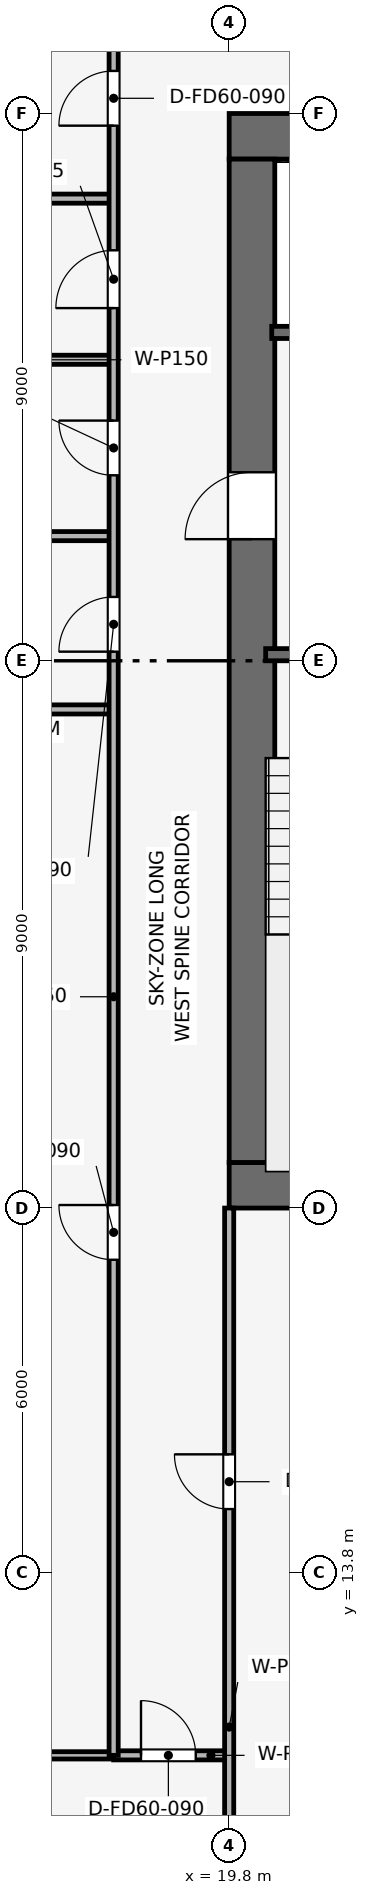
"""IFC4 building model, lengths in metres.
Left out: names, types, materials, properties, quantities, classifications, styles, units other than length and angle.
Written with IfcOpenShell. Run it as: python <this file> out.ifc"""

import sys

from ifc_helpers import new_model, si_unit, direction, frame, frame_2d, origin, place, context, subcontext, project, spatial, rectangle, extrude, element, fill, save


model = new_model("IFC4")
c1 = context("Model", 3, precision=1e-05, world=origin(), true_north=direction((0.0, 1.0)))
c2 = subcontext(c1, "Body", "Model", "MODEL_VIEW")
j1 = project(units=[si_unit("LENGTHUNIT", "METRE"), si_unit("PLANEANGLEUNIT", "RADIAN")], contexts=[c1])
p1 = place(None, origin())
s1 = spatial("IfcSite", under=j1, at=p1, CompositionType="ELEMENT")
p2 = place(p1, origin())
s2 = spatial("IfcBuilding", under=s1, at=p2, CompositionType="ELEMENT")
p3 = place(p2, frame((0.0, 0.0, 261.6)))
s3 = spatial("IfcBuildingStorey", under=s2, at=p3, CompositionType="ELEMENT", Elevation=261.6)
p4 = place(p3, frame((19.8, 20.175, 0.0), z_axis=(0.0, 0.0, 1.0), x_axis=(1.0, 0.0, 0.0)))
e1 = element("IfcWall", 1, at=p4, inside=s3, PredefinedType="SHEAR", context=c2, shape_type="SweptSolid", body=[
    extrude(rectangle(XDim=18.0, YDim=0.75, at=frame_2d((9.0, 0.0))), origin(), (0.0, 0.0, 1.0), 3.75),
])
p5 = place(p3, frame((19.8, 37.425, 0.0), z_axis=(0.0, 0.0, 1.0), x_axis=(1.0, 0.0, 0.0)))
e2 = element("IfcWall", 2, at=p5, inside=s3, PredefinedType="SHEAR", context=c2, shape_type="SweptSolid", body=[
    extrude(rectangle(XDim=18.0, YDim=0.75, at=frame_2d((9.0, 0.0))), origin(), (0.0, 0.0, 1.0), 3.75),
])
p6 = place(p5, frame((7.05, 0.0, 0.0)))
e3 = element("IfcOpeningElement", 3, at=p6, cuts=e2, PredefinedType="OPENING", context=c2, shape_type="SweptSolid", body=[
    extrude(rectangle(XDim=1.1, YDim=2.15, at=frame_2d((0.55, 1.075))), frame((0.0, 0.385, 0.0), z_axis=(0.0, -1.0, 0.0), x_axis=(1.0, 0.0, 0.0)), (0.0, 0.0, 1.0), 0.77),
])
p7 = place(p3, frame((20.175, 20.55, 0.0), z_axis=(0.0, 0.0, 1.0), x_axis=(0.0, 1.0, 0.0)))
e4 = element("IfcWall", 4, at=p7, inside=s3, PredefinedType="SHEAR", context=c2, shape_type="SweptSolid", body=[
    extrude(rectangle(XDim=16.5, YDim=0.75, at=frame_2d((8.25, 0.0))), origin(), (0.0, 0.0, 1.0), 3.75),
])
p8 = place(p7, frame((10.25, 0.0, 0.0)))
e5 = element("IfcOpeningElement", 5, at=p8, cuts=e4, PredefinedType="OPENING", context=c2, shape_type="SweptSolid", body=[
    extrude(rectangle(XDim=1.1, YDim=2.15, at=frame_2d((0.55, 1.075))), frame((0.0, 0.385, 0.0), z_axis=(0.0, -1.0, 0.0), x_axis=(1.0, 0.0, 0.0)), (0.0, 0.0, 1.0), 0.77),
])
p9 = place(p3, frame((20.4, 28.9, 0.0), z_axis=(0.0, 0.0, 1.0), x_axis=(1.0, 0.0, 0.0)))
e6 = element("IfcWall", 6, at=p9, inside=s3, PredefinedType="SHEAR", context=c2, shape_type="SweptSolid", body=[
    extrude(rectangle(XDim=3.15, YDim=0.2, at=frame_2d((1.575, 0.0))), origin(), (0.0, 0.0, 1.0), 3.5),
])
p10 = place(p9, frame((0.8, 0.0, 0.0)))
e7 = element("IfcOpeningElement", 7, at=p10, cuts=e6, PredefinedType="OPENING", context=c2, shape_type="SweptSolid", body=[
    extrude(rectangle(XDim=1.0, YDim=2.1, at=frame_2d((0.5, 1.05))), frame((0.0, 0.11, 0.0), z_axis=(0.0, -1.0, 0.0), x_axis=(1.0, 0.0, 0.0)), (0.0, 0.0, 1.0), 0.22),
])
p11 = place(p3, frame((20.5, 34.2, 0.0), z_axis=(0.0, 0.0, 1.0), x_axis=(1.0, 0.0, 0.0)))
e8 = element("IfcWall", 8, at=p11, inside=s3, PredefinedType="SHEAR", context=c2, shape_type="SweptSolid", body=[
    extrude(rectangle(XDim=3.05, YDim=0.2, at=frame_2d((1.525, 0.0))), origin(), (0.0, 0.0, 1.0), 3.5),
])
p12 = place(p11, frame((0.75, 0.0, 0.0)))
e9 = element("IfcOpeningElement", 9, at=p12, cuts=e8, PredefinedType="OPENING", context=c2, shape_type="SweptSolid", body=[
    extrude(rectangle(XDim=1.1, YDim=2.15, at=frame_2d((0.55, 1.075))), frame((0.0, 0.11, 0.0), z_axis=(0.0, -1.0, 0.0), x_axis=(1.0, 0.0, 0.0)), (0.0, 0.0, 1.0), 0.22),
])
p13 = place(p3, frame((4.03, 28.0, 0.0), z_axis=(0.0, 0.0, 1.0), x_axis=(1.0, 0.0, 0.0)))
e10 = element("IfcWall", 10, at=p13, inside=s3, PredefinedType="PARTITIONING", context=c2, shape_type="SweptSolid", body=[
    extrude(rectangle(XDim=13.87, YDim=0.15, at=frame_2d((6.935, 0.0))), origin(), (0.0, 0.0, 1.0), 3.085),
])
for number, where, z_axis, x_axis in (
    (11, (14.8, 36.4, 0.0), (0.0, 0.0, 1.0), (1.0, 0.0, 0.0)),
    (12, (14.8, 30.85, 0.0), (0.0, 0.0, 1.0), (1.0, 0.0, 0.0)),
    (13, (14.8, 33.75, 0.0), (0.0, 0.0, 1.0), (1.0, 0.0, 0.0)),
):
    element("IfcWall", number, at=place(p3, frame(where, z_axis=z_axis, x_axis=x_axis)), inside=s3, PredefinedType="PARTITIONING", context=c2, shape_type="SweptSolid", body=[
        extrude(rectangle(XDim=3.1, YDim=0.15, at=frame_2d((1.55, 0.0))), origin(), (0.0, 0.0, 1.0), 3.5),
    ])
p14 = place(p3, frame((10.8, 10.8, 0.0), z_axis=(0.0, 0.0, 1.0), x_axis=(1.0, 0.0, 0.0)))
e14 = element("IfcWall", 14, at=p14, inside=s3, PredefinedType="PARTITIONING", context=c2, shape_type="SweptSolid", body=[
    extrude(rectangle(XDim=7.1, YDim=0.12, at=frame_2d((3.55, 0.0))), origin(), (0.0, 0.0, 1.0), 3.085),
])
p15 = place(p3, frame((17.9, 10.8, 0.0), z_axis=(0.0, 0.0, 1.0), x_axis=(1.0, 0.0, 0.0)))
e15 = element("IfcWall", 15, at=p15, inside=s3, PredefinedType="PARTITIONING", context=c2, shape_type="SweptSolid", body=[
    extrude(rectangle(XDim=1.9, YDim=0.15, at=frame_2d((0.95, 0.0))), origin(), (0.0, 0.0, 1.0), 3.5),
])
p16 = place(p15, frame((0.45, 0.0, 0.0)))
e16 = element("IfcOpeningElement", 16, at=p16, cuts=e15, PredefinedType="OPENING", context=c2, shape_type="SweptSolid", body=[
    extrude(rectangle(XDim=0.9, YDim=2.1, at=frame_2d((0.45, 1.05))), frame((0.0, 0.085, 0.0), z_axis=(0.0, -1.0, 0.0), x_axis=(1.0, 0.0, 0.0)), (0.0, 0.0, 1.0), 0.17),
])
p17 = place(p3, frame((19.8, 4.03, 0.0), z_axis=(0.0, 0.0, 1.0), x_axis=(0.0, 1.0, 0.0)))
e17 = element("IfcWall", 17, at=p17, inside=s3, PredefinedType="PARTITIONING", context=c2, shape_type="SweptSolid", body=[
    extrude(rectangle(XDim=15.77, YDim=0.15, at=frame_2d((7.885, 0.0))), origin(), (0.0, 0.0, 1.0), 3.085),
])
p18 = place(p17, frame((10.82, 0.0, 0.0)))
e18 = element("IfcOpeningElement", 18, at=p18, cuts=e17, PredefinedType="OPENING", context=c2, shape_type="SweptSolid", body=[
    extrude(rectangle(XDim=0.9, YDim=2.1, at=frame_2d((0.45, 1.05))), frame((0.0, 0.085, 0.0), z_axis=(0.0, -1.0, 0.0), x_axis=(1.0, 0.0, 0.0)), (0.0, 0.0, 1.0), 0.17),
])
p19 = place(p3, frame((17.9, 10.8, 0.0), z_axis=(0.0, 0.0, 1.0), x_axis=(0.0, 1.0, 0.0)))
e19 = element("IfcWall", 19, at=p19, inside=s3, PredefinedType="PARTITIONING", context=c2, shape_type="SweptSolid", body=[
    extrude(rectangle(XDim=28.9, YDim=0.15, at=frame_2d((14.45, 0.0))), origin(), (0.0, 0.0, 1.0), 3.085),
])
p20 = place(p19, frame((8.15, 0.0, 0.0)))
e20 = element("IfcOpeningElement", 20, at=p20, cuts=e19, PredefinedType="OPENING", context=c2, shape_type="SweptSolid", body=[
    extrude(rectangle(XDim=0.9, YDim=2.1, at=frame_2d((0.45, 1.05))), frame((0.0, 0.085, 0.0), z_axis=(0.0, -1.0, 0.0), x_axis=(1.0, 0.0, 0.0)), (0.0, 0.0, 1.0), 0.17),
])
p21 = place(p19, frame((18.15, 0.0, 0.0)))
e21 = element("IfcOpeningElement", 21, at=p21, cuts=e19, PredefinedType="OPENING", context=c2, shape_type="SweptSolid", body=[
    extrude(rectangle(XDim=0.9, YDim=2.1, at=frame_2d((0.45, 1.05))), frame((0.0, 0.085, 0.0), z_axis=(0.0, -1.0, 0.0), x_axis=(1.0, 0.0, 0.0)), (0.0, 0.0, 1.0), 0.17),
])
p22 = place(p19, frame((21.05, 0.0, 0.0)))
e22 = element("IfcOpeningElement", 22, at=p22, cuts=e19, PredefinedType="OPENING", context=c2, shape_type="SweptSolid", body=[
    extrude(rectangle(XDim=0.9, YDim=2.1, at=frame_2d((0.45, 1.05))), frame((0.0, 0.085, 0.0), z_axis=(0.0, -1.0, 0.0), x_axis=(1.0, 0.0, 0.0)), (0.0, 0.0, 1.0), 0.17),
])
p23 = place(p19, frame((23.8, 0.0, 0.0)))
e23 = element("IfcOpeningElement", 23, at=p23, cuts=e19, PredefinedType="OPENING", context=c2, shape_type="SweptSolid", body=[
    extrude(rectangle(XDim=0.95, YDim=2.1, at=frame_2d((0.475, 1.05))), frame((0.0, 0.085, 0.0), z_axis=(0.0, -1.0, 0.0), x_axis=(1.0, 0.0, 0.0)), (0.0, 0.0, 1.0), 0.17),
])
p24 = place(p19, frame((26.8, 0.0, 0.0)))
e24 = element("IfcOpeningElement", 24, at=p24, cuts=e19, PredefinedType="OPENING", context=c2, shape_type="SweptSolid", body=[
    extrude(rectangle(XDim=0.9, YDim=2.1, at=frame_2d((0.45, 1.05))), frame((0.0, 0.085, 0.0), z_axis=(0.0, -1.0, 0.0), x_axis=(1.0, 0.0, 0.0)), (0.0, 0.0, 1.0), 0.17),
])
p25 = place(p16, origin())
e25 = element("IfcDoor", 25, at=p25, inside=s3, OperationType="SINGLE_SWING_LEFT", PredefinedType="DOOR", context=c2, shape_type="SweptSolid", body=[
    extrude(rectangle(XDim=0.9, YDim=2.1, at=frame_2d((0.45, 1.05))), frame((0.0, 0.025, 0.0), z_axis=(0.0, -1.0, 0.0), x_axis=(1.0, 0.0, 0.0)), (0.0, 0.0, 1.0), 0.05),
])
fill(e16, e25)
p26 = place(p18, origin())
e26 = element("IfcDoor", 26, at=p26, inside=s3, OperationType="SINGLE_SWING_RIGHT", PredefinedType="DOOR", context=c2, shape_type="SweptSolid", body=[
    extrude(rectangle(XDim=0.9, YDim=2.1, at=frame_2d((0.45, 1.05))), frame((0.0, 0.025, 0.0), z_axis=(0.0, -1.0, 0.0), x_axis=(1.0, 0.0, 0.0)), (0.0, 0.0, 1.0), 0.05),
])
fill(e18, e26)
p27 = place(p20, origin())
e27 = element("IfcDoor", 27, at=p27, inside=s3, OperationType="SINGLE_SWING_RIGHT", PredefinedType="DOOR", context=c2, shape_type="SweptSolid", body=[
    extrude(rectangle(XDim=0.9, YDim=2.1, at=frame_2d((0.45, 1.05))), frame((0.0, 0.025, 0.0), z_axis=(0.0, -1.0, 0.0), x_axis=(1.0, 0.0, 0.0)), (0.0, 0.0, 1.0), 0.05),
])
fill(e20, e27)
p28 = place(p21, origin())
e28 = element("IfcDoor", 28, at=p28, inside=s3, OperationType="SINGLE_SWING_LEFT", PredefinedType="DOOR", context=c2, shape_type="SweptSolid", body=[
    extrude(rectangle(XDim=0.9, YDim=2.1, at=frame_2d((0.45, 1.05))), frame((0.0, 0.025, 0.0), z_axis=(0.0, -1.0, 0.0), x_axis=(1.0, 0.0, 0.0)), (0.0, 0.0, 1.0), 0.05),
])
fill(e21, e28)
p29 = place(p22, origin())
e29 = element("IfcDoor", 29, at=p29, inside=s3, OperationType="SINGLE_SWING_RIGHT", PredefinedType="DOOR", context=c2, shape_type="SweptSolid", body=[
    extrude(rectangle(XDim=0.9, YDim=2.1, at=frame_2d((0.45, 1.05))), frame((0.0, 0.025, 0.0), z_axis=(0.0, -1.0, 0.0), x_axis=(1.0, 0.0, 0.0)), (0.0, 0.0, 1.0), 0.05),
])
fill(e22, e29)
p30 = place(p23, origin())
e30 = element("IfcDoor", 30, at=p30, inside=s3, OperationType="SINGLE_SWING_LEFT", PredefinedType="DOOR", context=c2, shape_type="SweptSolid", body=[
    extrude(rectangle(XDim=0.95, YDim=2.1, at=frame_2d((0.475, 1.05))), frame((0.0, 0.025, 0.0), z_axis=(0.0, -1.0, 0.0), x_axis=(1.0, 0.0, 0.0)), (0.0, 0.0, 1.0), 0.05),
])
fill(e23, e30)
p31 = place(p24, origin())
e31 = element("IfcDoor", 31, at=p31, inside=s3, OperationType="SINGLE_SWING_LEFT", PredefinedType="DOOR", context=c2, shape_type="SweptSolid", body=[
    extrude(rectangle(XDim=0.9, YDim=2.1, at=frame_2d((0.45, 1.05))), frame((0.0, 0.025, 0.0), z_axis=(0.0, -1.0, 0.0), x_axis=(1.0, 0.0, 0.0)), (0.0, 0.0, 1.0), 0.05),
])
fill(e24, e31)
p32 = place(p8, origin())
e32 = element("IfcDoor", 32, at=p32, inside=s3, OperationType="SINGLE_SWING_LEFT", PredefinedType="DOOR", context=c2, shape_type="SweptSolid", body=[
    extrude(rectangle(XDim=1.1, YDim=2.15, at=frame_2d((0.55, 1.075))), frame((0.0, 0.025, 0.0), z_axis=(0.0, -1.0, 0.0), x_axis=(1.0, 0.0, 0.0)), (0.0, 0.0, 1.0), 0.05),
])
fill(e5, e32)
save(model, sys.argv[1])
